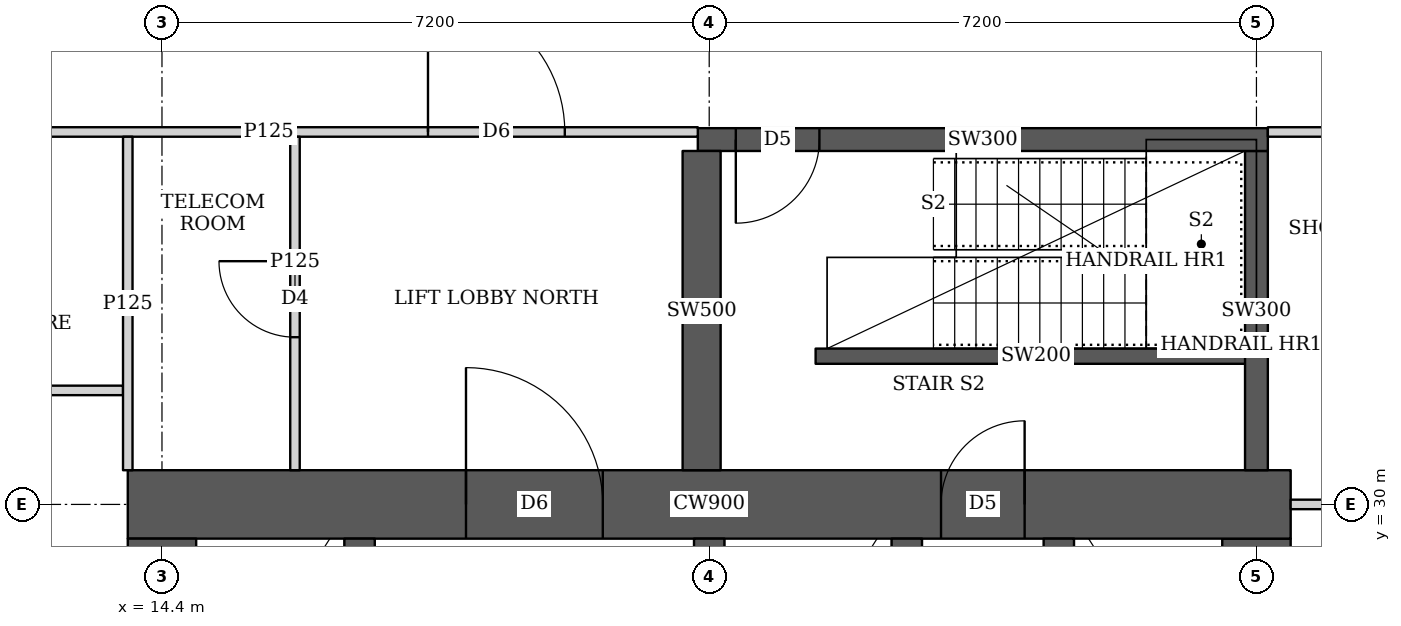
"""IFC4 building model, lengths in metres.
Left out: names, types, materials, properties, quantities, classifications, styles, units other than length and angle.
Written with IfcOpenShell. Run it as: python <this file> out.ifc"""

import sys

from ifc_helpers import new_model, si_unit, direction, frame, frame_2d, origin, place, context, subcontext, project, spatial, rectangle, extrude, element, fill, save


model = new_model("IFC4")
c1 = context("Model", 3, precision=1e-05, world=origin(), true_north=direction((0.0, 1.0)))
c2 = subcontext(c1, "Body", "Model", "MODEL_VIEW")
j1 = project(units=[si_unit("LENGTHUNIT", "METRE"), si_unit("PLANEANGLEUNIT", "RADIAN")], contexts=[c1])
p1 = place(None, origin())
s1 = spatial("IfcSite", under=j1, at=p1, CompositionType="ELEMENT")
p2 = place(p1, origin())
s2 = spatial("IfcBuilding", under=s1, at=p2, CompositionType="ELEMENT")
p3 = place(p2, frame((0.0, 0.0, 77.9)))
s3 = spatial("IfcBuildingStorey", under=s2, at=p3, CompositionType="ELEMENT", Elevation=77.9)
p4 = place(p3, frame((13.95, 30.0, 0.0), z_axis=(0.0, 0.0, 1.0), x_axis=(1.0, 0.0, 0.0)))
e1 = element("IfcWall", 1, at=p4, inside=s3, PredefinedType="SHEAR", context=c2, shape_type="SweptSolid", body=[
    extrude(rectangle(XDim=15.3, YDim=0.9, at=frame_2d((7.65, 0.0))), origin(), (0.0, 0.0, 1.0), 3.75),
])
p5 = place(p4, frame((4.45, 0.0, 0.0)))
e2 = element("IfcOpeningElement", 2, at=p5, cuts=e1, PredefinedType="OPENING", context=c2, shape_type="SweptSolid", body=[
    extrude(rectangle(XDim=1.8, YDim=2.1, at=frame_2d((0.9, 1.05))), frame((0.0, 0.46, 0.0), z_axis=(0.0, -1.0, 0.0), x_axis=(1.0, 0.0, 0.0)), (0.0, 0.0, 1.0), 0.92),
])
p6 = place(p4, frame((10.7, 0.0, 0.0)))
e3 = element("IfcOpeningElement", 3, at=p6, cuts=e1, PredefinedType="OPENING", context=c2, shape_type="SweptSolid", body=[
    extrude(rectangle(XDim=1.1, YDim=2.1, at=frame_2d((0.55, 1.05))), frame((0.0, 0.46, 0.0), z_axis=(0.0, -1.0, 0.0), x_axis=(1.0, 0.0, 0.0)), (0.0, 0.0, 1.0), 0.92),
])
for number, where, z_axis, x_axis in (
    (4, (14.4, 15.45, 0.0), (0.0, 0.0, 1.0), (0.0, 1.0, 0.0)),
    (5, (28.8, 15.45, 0.0), (0.0, 0.0, 1.0), (0.0, 1.0, 0.0)),
):
    element("IfcWall", number, at=place(p3, frame(where, z_axis=z_axis, x_axis=x_axis)), inside=s3, PredefinedType="SHEAR", context=c2, shape_type="SweptSolid", body=[
        extrude(rectangle(XDim=14.1, YDim=0.9, at=frame_2d((7.05, 0.0))), origin(), (0.0, 0.0, 1.0), 3.75),
    ])
p7 = place(p3, frame((17.0, 15.45, 0.0), z_axis=(0.0, 0.0, 1.0), x_axis=(0.0, 1.0, 0.0)))
e6 = element("IfcWall", 6, at=p7, inside=s3, PredefinedType="SHEAR", context=c2, shape_type="SweptSolid", body=[
    extrude(rectangle(XDim=14.1, YDim=0.4, at=frame_2d((7.05, 0.0))), origin(), (0.0, 0.0, 1.0), 3.75),
])
p8 = place(p7, frame((0.875, 0.0, 0.0)))
e7 = element("IfcOpeningElement", 7, at=p8, cuts=e6, PredefinedType="OPENING", context=c2, shape_type="SweptSolid", body=[
    extrude(rectangle(XDim=1.1, YDim=2.1, at=frame_2d((0.55, 1.05))), frame((0.0, 0.21, 0.0), z_axis=(0.0, -1.0, 0.0), x_axis=(1.0, 0.0, 0.0)), (0.0, 0.0, 1.0), 0.42),
])
p9 = place(p7, frame((4.625, 0.0, 0.0)))
e8 = element("IfcOpeningElement", 8, at=p9, cuts=e6, PredefinedType="OPENING", context=c2, shape_type="SweptSolid", body=[
    extrude(rectangle(XDim=1.1, YDim=2.1, at=frame_2d((0.55, 1.05))), frame((0.0, 0.21, 0.0), z_axis=(0.0, -1.0, 0.0), x_axis=(1.0, 0.0, 0.0)), (0.0, 0.0, 1.0), 0.42),
])
p10 = place(p7, frame((8.375, 0.0, 0.0)))
e9 = element("IfcOpeningElement", 9, at=p10, cuts=e6, PredefinedType="OPENING", context=c2, shape_type="SweptSolid", body=[
    extrude(rectangle(XDim=1.1, YDim=2.1, at=frame_2d((0.55, 1.05))), frame((0.0, 0.21, 0.0), z_axis=(0.0, -1.0, 0.0), x_axis=(1.0, 0.0, 0.0)), (0.0, 0.0, 1.0), 0.42),
])
p11 = place(p7, frame((12.125, 0.0, 0.0)))
e10 = element("IfcOpeningElement", 10, at=p11, cuts=e6, PredefinedType="OPENING", context=c2, shape_type="SweptSolid", body=[
    extrude(rectangle(XDim=1.1, YDim=2.1, at=frame_2d((0.55, 1.05))), frame((0.0, 0.21, 0.0), z_axis=(0.0, -1.0, 0.0), x_axis=(1.0, 0.0, 0.0)), (0.0, 0.0, 1.0), 0.42),
])
for number, where, z_axis, x_axis in (
    (11, (21.6, 15.45, 0.0), (0.0, 0.0, 1.0), (0.0, 1.0, 0.0)),
    (12, (24.2, 15.45, 0.0), (0.0, 0.0, 1.0), (0.0, 1.0, 0.0)),
):
    element("IfcWall", number, at=place(p3, frame(where, z_axis=z_axis, x_axis=x_axis)), inside=s3, PredefinedType="SHEAR", context=c2, shape_type="SweptSolid", body=[
        extrude(rectangle(XDim=14.1, YDim=0.4, at=frame_2d((7.05, 0.0))), origin(), (0.0, 0.0, 1.0), 3.75),
    ])
p12 = place(p3, frame((26.2, 26.45, 0.0), z_axis=(0.0, 0.0, 1.0), x_axis=(0.0, 1.0, 0.0)))
e13 = element("IfcWall", 13, at=p12, inside=s3, PredefinedType="SHEAR", context=c2, shape_type="SweptSolid", body=[
    extrude(rectangle(XDim=3.1, YDim=0.4, at=frame_2d((1.55, 0.0))), origin(), (0.0, 0.0, 1.0), 3.75),
])
p13 = place(p12, frame((1.075, 0.0, 0.0)))
e14 = element("IfcOpeningElement", 14, at=p13, cuts=e13, PredefinedType="OPENING", context=c2, shape_type="SweptSolid", body=[
    extrude(rectangle(XDim=1.2, YDim=2.1, at=frame_2d((0.6, 1.05))), frame((0.0, 0.21, 0.0), z_axis=(0.0, -1.0, 0.0), x_axis=(1.0, 0.0, 0.0)), (0.0, 0.0, 1.0), 0.42),
])
p14 = place(p3, frame((21.45, 34.8, 0.0), z_axis=(0.0, 0.0, 1.0), x_axis=(1.0, 0.0, 0.0)))
e15 = element("IfcWall", 15, at=p14, inside=s3, PredefinedType="SHEAR", context=c2, shape_type="SweptSolid", body=[
    extrude(rectangle(XDim=7.5, YDim=0.3, at=frame_2d((3.75, 0.0))), origin(), (0.0, 0.0, 1.0), 3.75),
])
p15 = place(p14, frame((0.5, 0.0, 0.0)))
e16 = element("IfcOpeningElement", 16, at=p15, cuts=e15, PredefinedType="OPENING", context=c2, shape_type="SweptSolid", body=[
    extrude(rectangle(XDim=1.1, YDim=2.1, at=frame_2d((0.55, 1.05))), frame((0.0, 0.16, 0.0), z_axis=(0.0, -1.0, 0.0), x_axis=(1.0, 0.0, 0.0)), (0.0, 0.0, 1.0), 0.32),
])
p16 = place(p3, frame((21.5, 30.45, 0.0), z_axis=(0.0, 0.0, 1.0), x_axis=(0.0, 1.0, 0.0)))
e17 = element("IfcWall", 17, at=p16, inside=s3, PredefinedType="SHEAR", context=c2, shape_type="SweptSolid", body=[
    extrude(rectangle(XDim=4.2, YDim=0.5, at=frame_2d((2.1, 0.0))), origin(), (0.0, 0.0, 1.0), 3.75),
])
p17 = place(p3, frame((28.8, 30.45, 0.0), z_axis=(0.0, 0.0, 1.0), x_axis=(0.0, 1.0, 0.0)))
e18 = element("IfcWall", 18, at=p17, inside=s3, PredefinedType="SHEAR", context=c2, shape_type="SweptSolid", body=[
    extrude(rectangle(XDim=4.2, YDim=0.3, at=frame_2d((2.1, 0.0))), origin(), (0.0, 0.0, 1.0), 3.75),
])
p18 = place(p3, frame((10.163, 31.5, 0.0), z_axis=(0.0, 0.0, 1.0), x_axis=(1.0, 0.0, 0.0)))
e19 = element("IfcWall", 19, at=p18, inside=s3, PredefinedType="PARTITIONING", context=c2, shape_type="SweptSolid", body=[
    extrude(rectangle(XDim=3.725, YDim=0.125, at=frame_2d((1.862, 0.0))), origin(), (0.0, 0.0, 1.0), 3.5),
])
p19 = place(p3, frame((13.95, 30.45, 0.0), z_axis=(0.0, 0.0, 1.0), x_axis=(0.0, 1.0, 0.0)))
e20 = element("IfcWall", 20, at=p19, inside=s3, PredefinedType="PARTITIONING", context=c2, shape_type="SweptSolid", body=[
    extrude(rectangle(XDim=4.387, YDim=0.125, at=frame_2d((2.193, 0.0))), origin(), (0.0, 0.0, 1.0), 3.5),
])
p20 = place(p3, frame((10.163, 34.9, 0.0), z_axis=(0.0, 0.0, 1.0), x_axis=(1.0, 0.0, 0.0)))
e21 = element("IfcWall", 21, at=p20, inside=s3, PredefinedType="PARTITIONING", context=c2, shape_type="SweptSolid", body=[
    extrude(rectangle(XDim=11.287, YDim=0.125, at=frame_2d((5.644, 0.0))), origin(), (0.0, 0.0, 1.0), 3.5),
])
p21 = place(p20, frame((7.737, 0.0, 0.0)))
e22 = element("IfcOpeningElement", 22, at=p21, cuts=e21, PredefinedType="OPENING", context=c2, shape_type="SweptSolid", body=[
    extrude(rectangle(XDim=1.8, YDim=2.1, at=frame_2d((0.9, 1.05))), frame((0.0, 0.073, 0.0), z_axis=(0.0, -1.0, 0.0), x_axis=(1.0, 0.0, 0.0)), (0.0, 0.0, 1.0), 0.145),
])
p22 = place(p3, frame((16.15, 30.45, 0.0), z_axis=(0.0, 0.0, 1.0), x_axis=(0.0, 1.0, 0.0)))
e23 = element("IfcWall", 23, at=p22, inside=s3, PredefinedType="PARTITIONING", context=c2, shape_type="SweptSolid", body=[
    extrude(rectangle(XDim=4.387, YDim=0.125, at=frame_2d((2.193, 0.0))), origin(), (0.0, 0.0, 1.0), 3.5),
])
p23 = place(p22, frame((1.75, 0.0, 0.0)))
e24 = element("IfcOpeningElement", 24, at=p23, cuts=e23, PredefinedType="OPENING", context=c2, shape_type="SweptSolid", body=[
    extrude(rectangle(XDim=1.0, YDim=2.1, at=frame_2d((0.5, 1.05))), frame((0.0, 0.073, 0.0), z_axis=(0.0, -1.0, 0.0), x_axis=(1.0, 0.0, 0.0)), (0.0, 0.0, 1.0), 0.145),
])
p24 = place(p3, frame((28.95, 34.9, 0.0), z_axis=(0.0, 0.0, 1.0), x_axis=(1.0, 0.0, 0.0)))
e25 = element("IfcWall", 25, at=p24, inside=s3, PredefinedType="PARTITIONING", context=c2, shape_type="SweptSolid", body=[
    extrude(rectangle(XDim=4.588, YDim=0.125, at=frame_2d((2.294, 0.0))), origin(), (0.0, 0.0, 1.0), 3.5),
])
p25 = place(p3, frame((29.25, 30.0, 0.0), z_axis=(0.0, 0.0, 1.0), x_axis=(1.0, 0.0, 0.0)))
e26 = element("IfcWall", 26, at=p25, inside=s3, PredefinedType="PARTITIONING", context=c2, shape_type="SweptSolid", body=[
    extrude(rectangle(XDim=2.949, YDim=0.125, at=frame_2d((1.475, 0.0))), origin(), (0.0, 0.0, 1.0), 3.5),
])
p26 = place(p3, frame((23.0, 31.95, 0.0), z_axis=(0.0, 0.0, 1.0), x_axis=(1.0, 0.0, 0.0)))
e27 = element("IfcWall", 27, at=p26, inside=s3, PredefinedType="SHEAR", context=c2, shape_type="SweptSolid", body=[
    extrude(rectangle(XDim=5.8, YDim=0.2, at=frame_2d((2.9, 0.0))), origin(), (0.0, 0.0, 1.0), 3.75),
])
p27 = place(p23, origin())
e28 = element("IfcDoor", 28, at=p27, inside=s3, OperationType="SINGLE_SWING_RIGHT", PredefinedType="DOOR", context=c2, shape_type="SweptSolid", body=[
    extrude(rectangle(XDim=1.0, YDim=2.1, at=frame_2d((0.5, 1.05))), frame((0.0, 0.025, 0.0), z_axis=(0.0, -1.0, 0.0), x_axis=(1.0, 0.0, 0.0)), (0.0, 0.0, 1.0), 0.05),
])
fill(e24, e28)
p28 = place(p21, origin())
e29 = element("IfcDoor", 29, at=p28, inside=s3, OperationType="DOUBLE_DOOR_SINGLE_SWING", PredefinedType="DOOR", context=c2, shape_type="SweptSolid", body=[
    extrude(rectangle(XDim=1.8, YDim=2.1, at=frame_2d((0.9, 1.05))), frame((0.0, 0.025, 0.0), z_axis=(0.0, -1.0, 0.0), x_axis=(1.0, 0.0, 0.0)), (0.0, 0.0, 1.0), 0.05),
])
fill(e22, e29)
p29 = place(p5, origin())
e30 = element("IfcDoor", 30, at=p29, inside=s3, OperationType="DOUBLE_DOOR_SINGLE_SWING", PredefinedType="DOOR", context=c2, shape_type="SweptSolid", body=[
    extrude(rectangle(XDim=1.8, YDim=2.1, at=frame_2d((0.9, 1.05))), frame((0.0, 0.025, 0.0), z_axis=(0.0, -1.0, 0.0), x_axis=(1.0, 0.0, 0.0)), (0.0, 0.0, 1.0), 0.05),
])
fill(e2, e30)
p30 = place(p6, origin())
e31 = element("IfcDoor", 31, at=p30, inside=s3, OperationType="SINGLE_SWING_RIGHT", PredefinedType="DOOR", context=c2, shape_type="SweptSolid", body=[
    extrude(rectangle(XDim=1.1, YDim=2.1, at=frame_2d((0.55, 1.05))), frame((0.0, 0.025, 0.0), z_axis=(0.0, -1.0, 0.0), x_axis=(1.0, 0.0, 0.0)), (0.0, 0.0, 1.0), 0.05),
])
fill(e3, e31)
p31 = place(p15, origin())
e32 = element("IfcDoor", 32, at=p31, inside=s3, OperationType="SINGLE_SWING_RIGHT", PredefinedType="DOOR", context=c2, shape_type="SweptSolid", body=[
    extrude(rectangle(XDim=1.1, YDim=2.1, at=frame_2d((0.55, 1.05))), frame((0.0, 0.025, 0.0), z_axis=(0.0, -1.0, 0.0), x_axis=(1.0, 0.0, 0.0)), (0.0, 0.0, 1.0), 0.05),
])
fill(e16, e32)
save(model, sys.argv[1])
